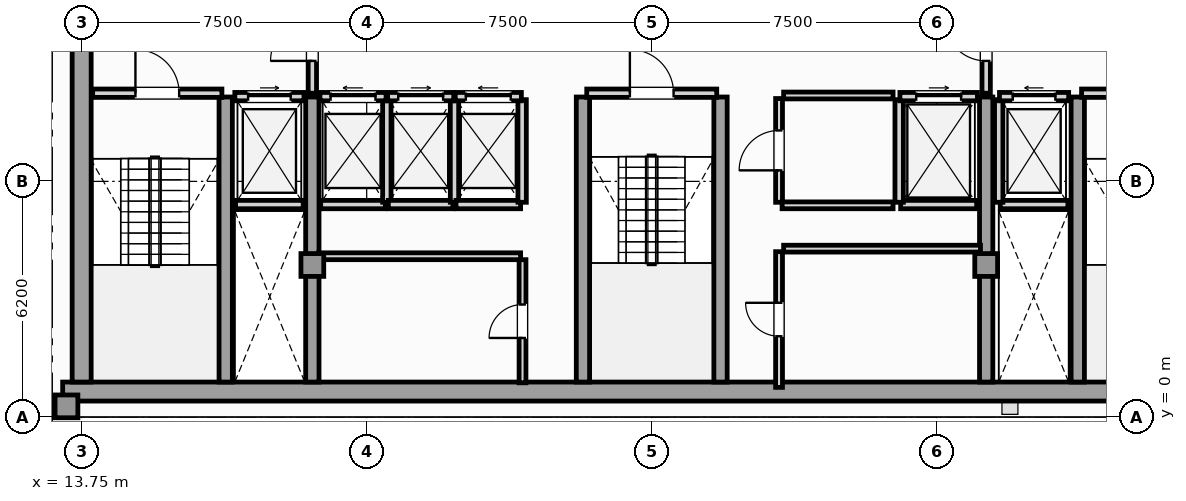
"""IFC4 building model, lengths in metres.
Left out: names, types, materials, properties, quantities, classifications, styles, units other than length and angle.
Written with IfcOpenShell. Run it as: python <this file> out.ifc"""

import sys

from ifc_helpers import new_model, si_unit, direction, frame, frame_2d, origin, origin_2d, place, context, subcontext, project, spatial, rectangle, extrude, element, fill, save


model = new_model("IFC4")
c1 = context("Model", 3, precision=1e-05, world=origin(), true_north=direction((0.0, 1.0)))
c2 = subcontext(c1, "Body", "Model", "MODEL_VIEW")
j1 = project(units=[si_unit("LENGTHUNIT", "METRE"), si_unit("PLANEANGLEUNIT", "RADIAN")], contexts=[c1])
p1 = place(None, origin())
s1 = spatial("IfcSite", under=j1, at=p1, CompositionType="ELEMENT")
p2 = place(p1, origin())
s2 = spatial("IfcBuilding", under=s1, at=p2, CompositionType="ELEMENT")
p3 = place(p2, frame((0.0, 0.0, 324.6)))
s3 = spatial("IfcBuildingStorey", under=s2, at=p3, CompositionType="ELEMENT", Elevation=324.6)
p4 = place(p3, frame((13.25, 0.67, 0.0), z_axis=(0.0, 0.0, 1.0), x_axis=(1.0, 0.0, 0.0)))
e1 = element("IfcWall", 1, at=p4, inside=s3, PredefinedType="SHEAR", context=c2, shape_type="SweptSolid", body=[
    extrude(rectangle(XDim=31.0, YDim=0.5, at=frame_2d((15.5, 0.0))), origin(), (0.0, 0.0, 1.0), 3.65),
])
p5 = place(p3, frame((13.75, 0.92, 0.0), z_axis=(0.0, 0.0, 1.0), x_axis=(0.0, 1.0, 0.0)))
e2 = element("IfcWall", 2, at=p5, inside=s3, PredefinedType="SHEAR", context=c2, shape_type="SweptSolid", body=[
    extrude(rectangle(XDim=10.53, YDim=0.5, at=frame_2d((5.265, 0.0))), origin(), (0.0, 0.0, 1.0), 3.65),
])
for number, where, z_axis, x_axis in (
    (3, (17.54, 0.92, 0.0), (0.0, 0.0, 1.0), (0.0, 1.0, 0.0)),
    (4, (19.82, 0.92, 0.0), (0.0, 0.0, 1.0), (0.0, 1.0, 0.0)),
    (5, (26.94, 0.92, 0.0), (0.0, 0.0, 1.0), (0.0, 1.0, 0.0)),
    (6, (30.56, 0.92, 0.0), (0.0, 0.0, 1.0), (0.0, 1.0, 0.0)),
    (7, (37.55, 0.92, 0.0), (0.0, 0.0, 1.0), (0.0, 1.0, 0.0)),
    (8, (39.96, 0.92, 0.0), (0.0, 0.0, 1.0), (0.0, 1.0, 0.0)),
):
    element("IfcWall", number, at=place(p3, frame(where, z_axis=z_axis, x_axis=x_axis)), inside=s3, PredefinedType="SHEAR", context=c2, shape_type="SweptSolid", body=[
        extrude(rectangle(XDim=7.5, YDim=0.35, at=frame_2d((3.75, 0.0))), origin(), (0.0, 0.0, 1.0), 3.65),
    ])
for number, where, z_axis, x_axis in (
    (9, (13.35, 0.28, 0.0), (0.0, 0.0, 1.0), (1.0, 0.0, 0.0)),
    (10, (19.82, 4.0, 0.0), (0.0, 0.0, 1.0), (1.0, 0.0, 0.0)),
    (11, (37.55, 4.0, 0.0), (0.0, 0.0, 1.0), (1.0, 0.0, 0.0)),
):
    element("IfcColumn", number, at=place(p3, frame(where, z_axis=z_axis, x_axis=x_axis)), inside=s3, PredefinedType="COLUMN", context=c2, shape_type="SweptSolid", body=[
        extrude(rectangle(XDim=0.6, YDim=0.6, at=origin_2d()), origin(), (0.0, 0.0, 1.0), 3.85),
    ])
p6 = place(p3, frame((12.375, 0.18, 0.0), z_axis=(0.0, 0.0, 1.0), x_axis=(1.0, 0.0, 0.0)))
e12 = element("IfcWall", 12, at=p6, inside=s3, PredefinedType="SOLIDWALL", context=c2, shape_type="SweptSolid", body=[
    extrude(rectangle(XDim=0.875, YDim=0.26, at=frame_2d((0.438, 0.0))), origin(), (0.0, 0.0, 1.0), 3.65),
])
p7 = place(p3, frame((17.8, 5.59, 0.0), z_axis=(0.0, 0.0, 1.0), x_axis=(1.0, 0.0, 0.0)))
e13 = element("IfcWall", 13, at=p7, inside=s3, PredefinedType="SOLIDWALL", context=c2, shape_type="SweptSolid", body=[
    extrude(rectangle(XDim=1.78, YDim=0.22, at=frame_2d((0.89, 0.0))), origin(), (0.0, 0.0, 1.0), 3.65),
])
p8 = place(p3, frame((17.78, 8.43, 0.0), z_axis=(0.0, 0.0, 1.0), x_axis=(1.0, 0.0, 0.0)))
e14 = element("IfcWall", 14, at=p8, inside=s3, PredefinedType="SOLIDWALL", context=c2, shape_type="SweptSolid", body=[
    extrude(rectangle(XDim=1.82, YDim=0.22, at=frame_2d((0.91, 0.0))), origin(), (0.0, 0.0, 1.0), 3.65),
])
p9 = place(p8, frame((0.35, 0.0, 0.0)))
e15 = element("IfcOpeningElement", 15, at=p9, cuts=e14, PredefinedType="OPENING", context=c2, shape_type="SweptSolid", body=[
    extrude(rectangle(XDim=1.12, YDim=2.25, at=frame_2d((0.56, 1.125))), frame((0.0, 0.12, 0.0), z_axis=(0.0, -1.0, 0.0), x_axis=(1.0, 0.0, 0.0)), (0.0, 0.0, 1.0), 0.24),
])
p10 = place(p3, frame((37.92, 5.59, 0.0), z_axis=(0.0, 0.0, 1.0), x_axis=(1.0, 0.0, 0.0)))
e16 = element("IfcWall", 16, at=p10, inside=s3, PredefinedType="SOLIDWALL", context=c2, shape_type="SweptSolid", body=[
    extrude(rectangle(XDim=1.78, YDim=0.22, at=frame_2d((0.89, 0.0))), origin(), (0.0, 0.0, 1.0), 3.65),
])
p11 = place(p3, frame((37.88, 5.65, 0.0), z_axis=(0.0, 0.0, 1.0), x_axis=(0.0, 1.0, 0.0)))
e17 = element("IfcWall", 17, at=p11, inside=s3, PredefinedType="SOLIDWALL", context=c2, shape_type="SweptSolid", body=[
    extrude(rectangle(XDim=2.7, YDim=0.22, at=frame_2d((1.35, 0.0))), origin(), (0.0, 0.0, 1.0), 3.65),
])
p12 = place(p3, frame((37.9, 8.43, 0.0), z_axis=(0.0, 0.0, 1.0), x_axis=(1.0, 0.0, 0.0)))
e18 = element("IfcWall", 18, at=p12, inside=s3, PredefinedType="SOLIDWALL", context=c2, shape_type="SweptSolid", body=[
    extrude(rectangle(XDim=1.82, YDim=0.22, at=frame_2d((0.91, 0.0))), origin(), (0.0, 0.0, 1.0), 3.65),
])
p13 = place(p12, frame((0.35, 0.0, 0.0)))
e19 = element("IfcOpeningElement", 19, at=p13, cuts=e18, PredefinedType="OPENING", context=c2, shape_type="SweptSolid", body=[
    extrude(rectangle(XDim=1.12, YDim=2.25, at=frame_2d((0.56, 1.125))), frame((0.0, 0.12, 0.0), z_axis=(0.0, -1.0, 0.0), x_axis=(1.0, 0.0, 0.0)), (0.0, 0.0, 1.0), 0.24),
])
p14 = place(p3, frame((35.3, 5.59, 0.0), z_axis=(0.0, 0.0, 1.0), x_axis=(1.0, 0.0, 0.0)))
e20 = element("IfcWall", 20, at=p14, inside=s3, PredefinedType="SOLIDWALL", context=c2, shape_type="SweptSolid", body=[
    extrude(rectangle(XDim=2.0, YDim=0.22, at=frame_2d((1.0, 0.0))), origin(), (0.0, 0.0, 1.0), 3.65),
])
p15 = place(p3, frame((35.26, 5.65, 0.0), z_axis=(0.0, 0.0, 1.0), x_axis=(0.0, 1.0, 0.0)))
e21 = element("IfcWall", 21, at=p15, inside=s3, PredefinedType="SOLIDWALL", context=c2, shape_type="SweptSolid", body=[
    extrude(rectangle(XDim=2.7, YDim=0.22, at=frame_2d((1.35, 0.0))), origin(), (0.0, 0.0, 1.0), 3.65),
])
p16 = place(p3, frame((35.28, 8.43, 0.0), z_axis=(0.0, 0.0, 1.0), x_axis=(1.0, 0.0, 0.0)))
e22 = element("IfcWall", 22, at=p16, inside=s3, PredefinedType="SOLIDWALL", context=c2, shape_type="SweptSolid", body=[
    extrude(rectangle(XDim=2.04, YDim=0.22, at=frame_2d((1.02, 0.0))), origin(), (0.0, 0.0, 1.0), 3.65),
])
p17 = place(p16, frame((0.43, 0.0, 0.0)))
e23 = element("IfcOpeningElement", 23, at=p17, cuts=e22, PredefinedType="OPENING", context=c2, shape_type="SweptSolid", body=[
    extrude(rectangle(XDim=1.18, YDim=2.2, at=frame_2d((0.59, 1.1))), frame((0.0, 0.12, 0.0), z_axis=(0.0, -1.0, 0.0), x_axis=(1.0, 0.0, 0.0)), (0.0, 0.0, 1.0), 0.24),
])
p18 = place(p3, frame((20.04, 5.59, 0.0), z_axis=(0.0, 0.0, 1.0), x_axis=(1.0, 0.0, 0.0)))
e24 = element("IfcWall", 24, at=p18, inside=s3, PredefinedType="SOLIDWALL", context=c2, shape_type="SweptSolid", body=[
    extrude(rectangle(XDim=1.7, YDim=0.22, at=frame_2d((0.85, 0.0))), origin(), (0.0, 0.0, 1.0), 3.65),
])
p19 = place(p3, frame((21.78, 5.65, 0.0), z_axis=(0.0, 0.0, 1.0), x_axis=(0.0, 1.0, 0.0)))
e25 = element("IfcWall", 25, at=p19, inside=s3, PredefinedType="SOLIDWALL", context=c2, shape_type="SweptSolid", body=[
    extrude(rectangle(XDim=2.7, YDim=0.22, at=frame_2d((1.35, 0.0))), origin(), (0.0, 0.0, 1.0), 3.65),
])
p20 = place(p3, frame((20.02, 8.43, 0.0), z_axis=(0.0, 0.0, 1.0), x_axis=(1.0, 0.0, 0.0)))
e26 = element("IfcWall", 26, at=p20, inside=s3, PredefinedType="SOLIDWALL", context=c2, shape_type="SweptSolid", body=[
    extrude(rectangle(XDim=1.74, YDim=0.22, at=frame_2d((0.87, 0.0))), origin(), (0.0, 0.0, 1.0), 3.65),
])
p21 = place(p20, frame((0.28, 0.0, 0.0)))
e27 = element("IfcOpeningElement", 27, at=p21, cuts=e26, PredefinedType="OPENING", context=c2, shape_type="SweptSolid", body=[
    extrude(rectangle(XDim=1.18, YDim=2.2, at=frame_2d((0.59, 1.1))), frame((0.0, 0.12, 0.0), z_axis=(0.0, -1.0, 0.0), x_axis=(1.0, 0.0, 0.0)), (0.0, 0.0, 1.0), 0.24),
])
p22 = place(p3, frame((21.82, 5.59, 0.0), z_axis=(0.0, 0.0, 1.0), x_axis=(1.0, 0.0, 0.0)))
e28 = element("IfcWall", 28, at=p22, inside=s3, PredefinedType="SOLIDWALL", context=c2, shape_type="SweptSolid", body=[
    extrude(rectangle(XDim=1.7, YDim=0.22, at=frame_2d((0.85, 0.0))), origin(), (0.0, 0.0, 1.0), 3.65),
])
p23 = place(p3, frame((23.56, 5.65, 0.0), z_axis=(0.0, 0.0, 1.0), x_axis=(0.0, 1.0, 0.0)))
e29 = element("IfcWall", 29, at=p23, inside=s3, PredefinedType="SOLIDWALL", context=c2, shape_type="SweptSolid", body=[
    extrude(rectangle(XDim=2.7, YDim=0.22, at=frame_2d((1.35, 0.0))), origin(), (0.0, 0.0, 1.0), 3.65),
])
p24 = place(p3, frame((21.8, 8.43, 0.0), z_axis=(0.0, 0.0, 1.0), x_axis=(1.0, 0.0, 0.0)))
e30 = element("IfcWall", 30, at=p24, inside=s3, PredefinedType="SOLIDWALL", context=c2, shape_type="SweptSolid", body=[
    extrude(rectangle(XDim=1.74, YDim=0.22, at=frame_2d((0.87, 0.0))), origin(), (0.0, 0.0, 1.0), 3.65),
])
p25 = place(p24, frame((0.28, 0.0, 0.0)))
e31 = element("IfcOpeningElement", 31, at=p25, cuts=e30, PredefinedType="OPENING", context=c2, shape_type="SweptSolid", body=[
    extrude(rectangle(XDim=1.18, YDim=2.2, at=frame_2d((0.59, 1.1))), frame((0.0, 0.12, 0.0), z_axis=(0.0, -1.0, 0.0), x_axis=(1.0, 0.0, 0.0)), (0.0, 0.0, 1.0), 0.24),
])
p26 = place(p3, frame((23.6, 5.59, 0.0), z_axis=(0.0, 0.0, 1.0), x_axis=(1.0, 0.0, 0.0)))
e32 = element("IfcWall", 32, at=p26, inside=s3, PredefinedType="SOLIDWALL", context=c2, shape_type="SweptSolid", body=[
    extrude(rectangle(XDim=1.7, YDim=0.22, at=frame_2d((0.85, 0.0))), origin(), (0.0, 0.0, 1.0), 3.65),
])
p27 = place(p3, frame((25.34, 5.65, 0.0), z_axis=(0.0, 0.0, 1.0), x_axis=(0.0, 1.0, 0.0)))
e33 = element("IfcWall", 33, at=p27, inside=s3, PredefinedType="SOLIDWALL", context=c2, shape_type="SweptSolid", body=[
    extrude(rectangle(XDim=2.7, YDim=0.22, at=frame_2d((1.35, 0.0))), origin(), (0.0, 0.0, 1.0), 3.65),
])
p28 = place(p3, frame((23.58, 8.43, 0.0), z_axis=(0.0, 0.0, 1.0), x_axis=(1.0, 0.0, 0.0)))
e34 = element("IfcWall", 34, at=p28, inside=s3, PredefinedType="SOLIDWALL", context=c2, shape_type="SweptSolid", body=[
    extrude(rectangle(XDim=1.74, YDim=0.22, at=frame_2d((0.87, 0.0))), origin(), (0.0, 0.0, 1.0), 3.65),
])
p29 = place(p28, frame((0.28, 0.0, 0.0)))
e35 = element("IfcOpeningElement", 35, at=p29, cuts=e34, PredefinedType="OPENING", context=c2, shape_type="SweptSolid", body=[
    extrude(rectangle(XDim=1.18, YDim=2.2, at=frame_2d((0.59, 1.1))), frame((0.0, 0.12, 0.0), z_axis=(0.0, -1.0, 0.0), x_axis=(1.0, 0.0, 0.0)), (0.0, 0.0, 1.0), 0.24),
])
p30 = place(p3, frame((14.04, 8.52, 0.0), z_axis=(0.0, 0.0, 1.0), x_axis=(1.0, 0.0, 0.0)))
e36 = element("IfcWall", 36, at=p30, inside=s3, PredefinedType="SOLIDWALL", context=c2, shape_type="SweptSolid", body=[
    extrude(rectangle(XDim=3.4, YDim=0.22, at=frame_2d((1.7, 0.0))), origin(), (0.0, 0.0, 1.0), 3.65),
])
p31 = place(p30, frame((1.125, 0.0, 0.0)))
e37 = element("IfcOpeningElement", 37, at=p31, cuts=e36, PredefinedType="OPENING", context=c2, shape_type="SweptSolid", body=[
    extrude(rectangle(XDim=1.15, YDim=2.2, at=frame_2d((0.575, 1.1))), frame((0.0, 0.12, 0.0), z_axis=(0.0, -1.0, 0.0), x_axis=(1.0, 0.0, 0.0)), (0.0, 0.0, 1.0), 0.24),
])
p32 = place(p3, frame((40.06, 8.52, 0.0), z_axis=(0.0, 0.0, 1.0), x_axis=(1.0, 0.0, 0.0)))
e38 = element("IfcWall", 38, at=p32, inside=s3, PredefinedType="SOLIDWALL", context=c2, shape_type="SweptSolid", body=[
    extrude(rectangle(XDim=3.4, YDim=0.22, at=frame_2d((1.7, 0.0))), origin(), (0.0, 0.0, 1.0), 3.65),
])
p33 = place(p32, frame((1.125, 0.0, 0.0)))
e39 = element("IfcOpeningElement", 39, at=p33, cuts=e38, PredefinedType="OPENING", context=c2, shape_type="SweptSolid", body=[
    extrude(rectangle(XDim=1.15, YDim=2.2, at=frame_2d((0.575, 1.1))), frame((0.0, 0.12, 0.0), z_axis=(0.0, -1.0, 0.0), x_axis=(1.0, 0.0, 0.0)), (0.0, 0.0, 1.0), 0.24),
])
p34 = place(p3, frame((27.04, 8.52, 0.0), z_axis=(0.0, 0.0, 1.0), x_axis=(1.0, 0.0, 0.0)))
e40 = element("IfcWall", 40, at=p34, inside=s3, PredefinedType="SOLIDWALL", context=c2, shape_type="SweptSolid", body=[
    extrude(rectangle(XDim=3.42, YDim=0.22, at=frame_2d((1.71, 0.0))), origin(), (0.0, 0.0, 1.0), 3.65),
])
p35 = place(p34, frame((1.135, 0.0, 0.0)))
e41 = element("IfcOpeningElement", 41, at=p35, cuts=e40, PredefinedType="OPENING", context=c2, shape_type="SweptSolid", body=[
    extrude(rectangle(XDim=1.15, YDim=2.2, at=frame_2d((0.575, 1.1))), frame((0.0, 0.12, 0.0), z_axis=(0.0, -1.0, 0.0), x_axis=(1.0, 0.0, 0.0)), (0.0, 0.0, 1.0), 0.24),
])
p36 = place(p3, frame((19.82, 8.52, 0.0), z_axis=(0.0, 0.0, 1.0), x_axis=(0.0, 1.0, 0.0)))
e42 = element("IfcWall", 42, at=p36, inside=s3, PredefinedType="SOLIDWALL", context=c2, shape_type="SweptSolid", body=[
    extrude(rectangle(XDim=2.8, YDim=0.22, at=frame_2d((1.4, 0.0))), origin(), (0.0, 0.0, 1.0), 3.105),
])
p37 = place(p36, frame((0.85, 0.0, 0.0)))
e43 = element("IfcOpeningElement", 43, at=p37, cuts=e42, PredefinedType="OPENING", context=c2, shape_type="SweptSolid", body=[
    extrude(rectangle(XDim=1.1, YDim=2.2, at=frame_2d((0.55, 1.1))), frame((0.0, 0.12, 0.0), z_axis=(0.0, -1.0, 0.0), x_axis=(1.0, 0.0, 0.0)), (0.0, 0.0, 1.0), 0.24),
])
p38 = place(p3, frame((37.55, 8.52, 0.0), z_axis=(0.0, 0.0, 1.0), x_axis=(0.0, 1.0, 0.0)))
e44 = element("IfcWall", 44, at=p38, inside=s3, PredefinedType="SOLIDWALL", context=c2, shape_type="SweptSolid", body=[
    extrude(rectangle(XDim=2.8, YDim=0.22, at=frame_2d((1.4, 0.0))), origin(), (0.0, 0.0, 1.0), 3.105),
])
p39 = place(p38, frame((0.85, 0.0, 0.0)))
e45 = element("IfcOpeningElement", 45, at=p39, cuts=e44, PredefinedType="OPENING", context=c2, shape_type="SweptSolid", body=[
    extrude(rectangle(XDim=1.1, YDim=2.2, at=frame_2d((0.55, 1.1))), frame((0.0, 0.12, 0.0), z_axis=(0.0, -1.0, 0.0), x_axis=(1.0, 0.0, 0.0)), (0.0, 0.0, 1.0), 0.24),
])
p40 = place(p3, frame((25.35, 0.9, 0.0), z_axis=(0.0, 0.0, 1.0), x_axis=(0.0, 1.0, 0.0)))
e46 = element("IfcWall", 46, at=p40, inside=s3, PredefinedType="PARTITIONING", context=c2, shape_type="SweptSolid", body=[
    extrude(rectangle(XDim=3.24, YDim=0.18, at=frame_2d((1.62, 0.0))), origin(), (0.0, 0.0, 1.0), 3.65),
])
p41 = place(p40, frame((1.18, 0.0, 0.0)))
e47 = element("IfcOpeningElement", 47, at=p41, cuts=e46, PredefinedType="OPENING", context=c2, shape_type="SweptSolid", body=[
    extrude(rectangle(XDim=0.88, YDim=2.05, at=frame_2d((0.44, 1.025))), frame((0.0, 0.1, 0.0), z_axis=(0.0, -1.0, 0.0), x_axis=(1.0, 0.0, 0.0)), (0.0, 0.0, 1.0), 0.2),
])
p42 = place(p3, frame((19.98, 4.23, 0.0), z_axis=(0.0, 0.0, 1.0), x_axis=(1.0, 0.0, 0.0)))
e48 = element("IfcWall", 48, at=p42, inside=s3, PredefinedType="PARTITIONING", context=c2, shape_type="SweptSolid", body=[
    extrude(rectangle(XDim=5.32, YDim=0.18, at=frame_2d((2.66, 0.0))), origin(), (0.0, 0.0, 1.0), 3.65),
])
p43 = place(p3, frame((32.1, 0.78, 0.0), z_axis=(0.0, 0.0, 1.0), x_axis=(0.0, 1.0, 0.0)))
e49 = element("IfcWall", 49, at=p43, inside=s3, PredefinedType="PARTITIONING", context=c2, shape_type="SweptSolid", body=[
    extrude(rectangle(XDim=3.57, YDim=0.18, at=frame_2d((1.785, 0.0))), origin(), (0.0, 0.0, 1.0), 3.65),
])
p44 = place(p43, frame((1.345, 0.0, 0.0)))
e50 = element("IfcOpeningElement", 50, at=p44, cuts=e49, PredefinedType="OPENING", context=c2, shape_type="SweptSolid", body=[
    extrude(rectangle(XDim=0.88, YDim=2.05, at=frame_2d((0.44, 1.025))), frame((0.0, 0.1, 0.0), z_axis=(0.0, -1.0, 0.0), x_axis=(1.0, 0.0, 0.0)), (0.0, 0.0, 1.0), 0.2),
])
p45 = place(p3, frame((32.22, 4.43, 0.0), z_axis=(0.0, 0.0, 1.0), x_axis=(1.0, 0.0, 0.0)))
e51 = element("IfcWall", 51, at=p45, inside=s3, PredefinedType="PARTITIONING", context=c2, shape_type="SweptSolid", body=[
    extrude(rectangle(XDim=5.18, YDim=0.18, at=frame_2d((2.59, 0.0))), origin(), (0.0, 0.0, 1.0), 3.65),
])
p46 = place(p3, frame((32.1, 5.65, 0.0), z_axis=(0.0, 0.0, 1.0), x_axis=(0.0, 1.0, 0.0)))
e52 = element("IfcWall", 52, at=p46, inside=s3, PredefinedType="PARTITIONING", context=c2, shape_type="SweptSolid", body=[
    extrude(rectangle(XDim=2.73, YDim=0.18, at=frame_2d((1.365, 0.0))), origin(), (0.0, 0.0, 1.0), 3.65),
])
p47 = place(p46, frame((0.84, 0.0, 0.0)))
e53 = element("IfcOpeningElement", 53, at=p47, cuts=e52, PredefinedType="OPENING", context=c2, shape_type="SweptSolid", body=[
    extrude(rectangle(XDim=1.05, YDim=2.15, at=frame_2d((0.525, 1.075))), frame((0.0, 0.1, 0.0), z_axis=(0.0, -1.0, 0.0), x_axis=(1.0, 0.0, 0.0)), (0.0, 0.0, 1.0), 0.2),
])
p48 = place(p3, frame((32.22, 8.46, 0.0), z_axis=(0.0, 0.0, 1.0), x_axis=(1.0, 0.0, 0.0)))
e54 = element("IfcWall", 54, at=p48, inside=s3, PredefinedType="PARTITIONING", context=c2, shape_type="SweptSolid", body=[
    extrude(rectangle(XDim=2.88, YDim=0.18, at=frame_2d((1.44, 0.0))), origin(), (0.0, 0.0, 1.0), 3.65),
])
p49 = place(p3, frame((32.18, 5.57, 0.0), z_axis=(0.0, 0.0, 1.0), x_axis=(1.0, 0.0, 0.0)))
e55 = element("IfcWall", 55, at=p49, inside=s3, PredefinedType="PARTITIONING", context=c2, shape_type="SweptSolid", body=[
    extrude(rectangle(XDim=2.92, YDim=0.18, at=frame_2d((1.46, 0.0))), origin(), (0.0, 0.0, 1.0), 3.65),
])
p50 = place(p9, origin())
e56 = element("IfcDoor", 56, at=p50, inside=s3, OperationType="SLIDING_TO_RIGHT", PredefinedType="DOOR", context=c2, shape_type="SweptSolid", body=[
    extrude(rectangle(XDim=1.12, YDim=2.25, at=frame_2d((0.56, 1.125))), frame((0.0, 0.025, 0.0), z_axis=(0.0, -1.0, 0.0), x_axis=(1.0, 0.0, 0.0)), (0.0, 0.0, 1.0), 0.05),
])
fill(e15, e56)
p51 = place(p13, origin())
e57 = element("IfcDoor", 57, at=p51, inside=s3, OperationType="SLIDING_TO_LEFT", PredefinedType="DOOR", context=c2, shape_type="SweptSolid", body=[
    extrude(rectangle(XDim=1.12, YDim=2.25, at=frame_2d((0.56, 1.125))), frame((0.0, 0.025, 0.0), z_axis=(0.0, -1.0, 0.0), x_axis=(1.0, 0.0, 0.0)), (0.0, 0.0, 1.0), 0.05),
])
fill(e19, e57)
p52 = place(p17, origin())
e58 = element("IfcDoor", 58, at=p52, inside=s3, OperationType="SLIDING_TO_RIGHT", PredefinedType="DOOR", context=c2, shape_type="SweptSolid", body=[
    extrude(rectangle(XDim=1.18, YDim=2.2, at=frame_2d((0.59, 1.1))), frame((0.0, 0.025, 0.0), z_axis=(0.0, -1.0, 0.0), x_axis=(1.0, 0.0, 0.0)), (0.0, 0.0, 1.0), 0.05),
])
fill(e23, e58)
p53 = place(p21, origin())
e59 = element("IfcDoor", 59, at=p53, inside=s3, OperationType="SLIDING_TO_LEFT", PredefinedType="DOOR", context=c2, shape_type="SweptSolid", body=[
    extrude(rectangle(XDim=1.18, YDim=2.2, at=frame_2d((0.59, 1.1))), frame((0.0, 0.025, 0.0), z_axis=(0.0, -1.0, 0.0), x_axis=(1.0, 0.0, 0.0)), (0.0, 0.0, 1.0), 0.05),
])
fill(e27, e59)
p54 = place(p25, origin())
e60 = element("IfcDoor", 60, at=p54, inside=s3, OperationType="SLIDING_TO_RIGHT", PredefinedType="DOOR", context=c2, shape_type="SweptSolid", body=[
    extrude(rectangle(XDim=1.18, YDim=2.2, at=frame_2d((0.59, 1.1))), frame((0.0, 0.025, 0.0), z_axis=(0.0, -1.0, 0.0), x_axis=(1.0, 0.0, 0.0)), (0.0, 0.0, 1.0), 0.05),
])
fill(e31, e60)
p55 = place(p29, origin())
e61 = element("IfcDoor", 61, at=p55, inside=s3, OperationType="SLIDING_TO_LEFT", PredefinedType="DOOR", context=c2, shape_type="SweptSolid", body=[
    extrude(rectangle(XDim=1.18, YDim=2.2, at=frame_2d((0.59, 1.1))), frame((0.0, 0.025, 0.0), z_axis=(0.0, -1.0, 0.0), x_axis=(1.0, 0.0, 0.0)), (0.0, 0.0, 1.0), 0.05),
])
fill(e35, e61)
p56 = place(p31, origin())
e62 = element("IfcDoor", 62, at=p56, inside=s3, OperationType="SINGLE_SWING_LEFT", PredefinedType="DOOR", context=c2, shape_type="SweptSolid", body=[
    extrude(rectangle(XDim=1.15, YDim=2.2, at=frame_2d((0.575, 1.1))), frame((0.0, 0.025, 0.0), z_axis=(0.0, -1.0, 0.0), x_axis=(1.0, 0.0, 0.0)), (0.0, 0.0, 1.0), 0.05),
])
fill(e37, e62)
p57 = place(p35, origin())
e63 = element("IfcDoor", 63, at=p57, inside=s3, OperationType="SINGLE_SWING_LEFT", PredefinedType="DOOR", context=c2, shape_type="SweptSolid", body=[
    extrude(rectangle(XDim=1.15, YDim=2.2, at=frame_2d((0.575, 1.1))), frame((0.0, 0.025, 0.0), z_axis=(0.0, -1.0, 0.0), x_axis=(1.0, 0.0, 0.0)), (0.0, 0.0, 1.0), 0.05),
])
fill(e41, e63)
p58 = place(p37, origin())
e64 = element("IfcDoor", 64, at=p58, inside=s3, OperationType="SINGLE_SWING_LEFT", PredefinedType="DOOR", context=c2, shape_type="SweptSolid", body=[
    extrude(rectangle(XDim=1.1, YDim=2.2, at=frame_2d((0.55, 1.1))), frame((0.0, 0.025, 0.0), z_axis=(0.0, -1.0, 0.0), x_axis=(1.0, 0.0, 0.0)), (0.0, 0.0, 1.0), 0.05),
])
fill(e43, e64)
p59 = place(p39, origin())
e65 = element("IfcDoor", 65, at=p59, inside=s3, OperationType="SINGLE_SWING_RIGHT", PredefinedType="DOOR", context=c2, shape_type="SweptSolid", body=[
    extrude(rectangle(XDim=1.1, YDim=2.2, at=frame_2d((0.55, 1.1))), frame((0.0, 0.025, 0.0), z_axis=(0.0, -1.0, 0.0), x_axis=(1.0, 0.0, 0.0)), (0.0, 0.0, 1.0), 0.05),
])
fill(e45, e65)
p60 = place(p41, origin())
e66 = element("IfcDoor", 66, at=p60, inside=s3, OperationType="SINGLE_SWING_LEFT", PredefinedType="DOOR", context=c2, shape_type="SweptSolid", body=[
    extrude(rectangle(XDim=0.88, YDim=2.05, at=frame_2d((0.44, 1.025))), frame((0.0, 0.025, 0.0), z_axis=(0.0, -1.0, 0.0), x_axis=(1.0, 0.0, 0.0)), (0.0, 0.0, 1.0), 0.05),
])
fill(e47, e66)
p61 = place(p44, origin())
e67 = element("IfcDoor", 67, at=p61, inside=s3, OperationType="SINGLE_SWING_RIGHT", PredefinedType="DOOR", context=c2, shape_type="SweptSolid", body=[
    extrude(rectangle(XDim=0.88, YDim=2.05, at=frame_2d((0.44, 1.025))), frame((0.0, 0.025, 0.0), z_axis=(0.0, -1.0, 0.0), x_axis=(1.0, 0.0, 0.0)), (0.0, 0.0, 1.0), 0.05),
])
fill(e50, e67)
p62 = place(p47, origin())
e68 = element("IfcDoor", 68, at=p62, inside=s3, OperationType="SINGLE_SWING_LEFT", PredefinedType="DOOR", context=c2, shape_type="SweptSolid", body=[
    extrude(rectangle(XDim=1.05, YDim=2.15, at=frame_2d((0.525, 1.075))), frame((0.0, 0.025, 0.0), z_axis=(0.0, -1.0, 0.0), x_axis=(1.0, 0.0, 0.0)), (0.0, 0.0, 1.0), 0.05),
])
fill(e53, e68)
save(model, sys.argv[1])
